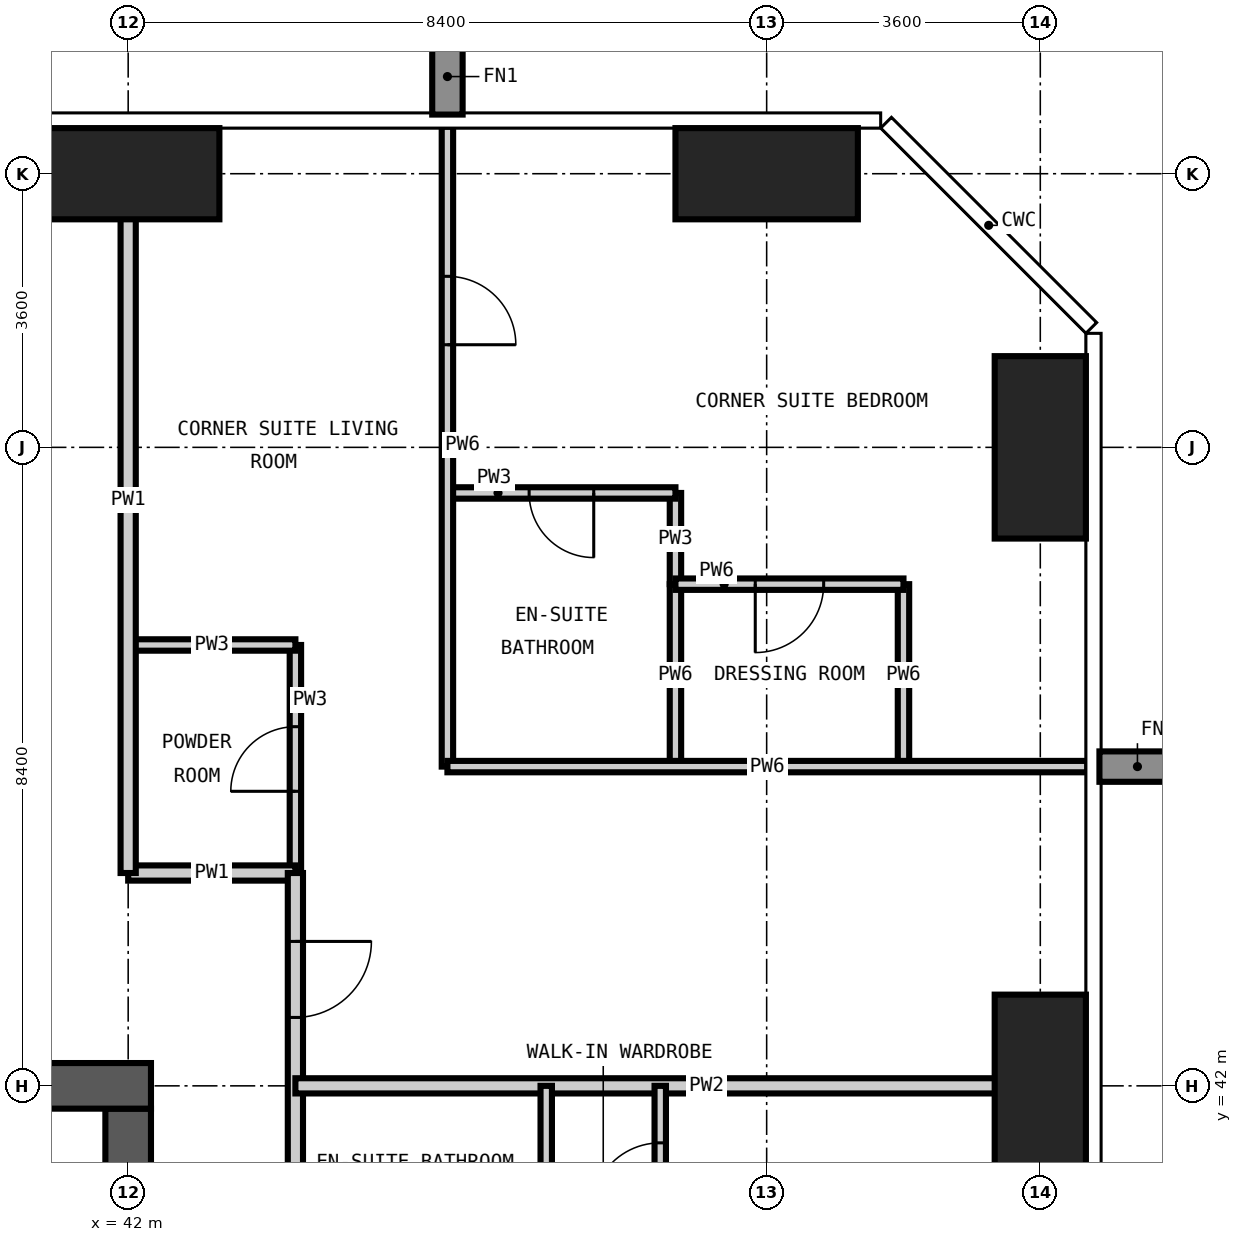
"""IFC4 building model, lengths in metres.
Left out: names, types, materials, properties, quantities, classifications, styles, units other than length and angle.
Written with IfcOpenShell. Run it as: python <this file> out.ifc"""

import sys

from ifc_helpers import new_model, si_unit, direction, frame, frame_2d, origin, origin_2d, place, context, subcontext, project, spatial, rectangle, extrude, element, fill, save


model = new_model("IFC4")
c1 = context("Model", 3, precision=1e-05, world=origin(), true_north=direction((0.0, 1.0)))
c2 = subcontext(c1, "Body", "Model", "MODEL_VIEW")
j1 = project(units=[si_unit("LENGTHUNIT", "METRE"), si_unit("PLANEANGLEUNIT", "RADIAN")], contexts=[c1])
p1 = place(None, origin())
s1 = spatial("IfcSite", under=j1, at=p1, CompositionType="ELEMENT")
p2 = place(p1, origin())
s2 = spatial("IfcBuilding", under=s1, at=p2, CompositionType="ELEMENT")
p3 = place(p2, frame((0.0, 0.0, 198.6)))
s3 = spatial("IfcBuildingStorey", under=s2, at=p3, CompositionType="ELEMENT", Elevation=198.6)
for number, where, z_axis, x_axis in (
    (1, (42.0, 54.0, -0.35), (0.0, 0.0, 1.0), (1.0, 0.0, 0.0)),
    (2, (50.4, 54.0, -0.35), (0.0, 0.0, 1.0), (1.0, 0.0, 0.0)),
):
    element("IfcColumn", number, at=place(p3, frame(where, z_axis=z_axis, x_axis=x_axis)), inside=s3, PredefinedType="COLUMN", context=c2, shape_type="SweptSolid", body=[
        extrude(rectangle(XDim=2.4, YDim=1.2, at=origin_2d()), origin(), (0.0, 0.0, 1.0), 3.6),
    ])
for number, where, z_axis, x_axis in (
    (3, (54.0, 42.0, -0.35), (0.0, 0.0, 1.0), (1.0, 0.0, 0.0)),
    (4, (54.0, 50.4, -0.35), (0.0, 0.0, 1.0), (1.0, 0.0, 0.0)),
):
    element("IfcColumn", number, at=place(p3, frame(where, z_axis=z_axis, x_axis=x_axis)), inside=s3, PredefinedType="COLUMN", context=c2, shape_type="SweptSolid", body=[
        extrude(rectangle(XDim=1.2, YDim=2.4, at=origin_2d()), origin(), (0.0, 0.0, 1.0), 3.6),
    ])
p4 = place(p3, frame((42.0, 17.1, -0.35), z_axis=(0.0, 0.0, 1.0), x_axis=(0.0, 1.0, 0.0)))
e5 = element("IfcWall", 5, at=p4, inside=s3, PredefinedType="SHEAR", context=c2, shape_type="SweptSolid", body=[
    extrude(rectangle(XDim=24.6, YDim=0.6, at=frame_2d((12.3, 0.0))), origin(), (0.0, 0.0, 1.0), 3.6),
])
p5 = place(p4, frame((0.5, 0.0, 0.35)))
e6 = element("IfcOpeningElement", 6, at=p5, cuts=e5, PredefinedType="OPENING", context=c2, shape_type="SweptSolid", body=[
    extrude(rectangle(XDim=1.2, YDim=2.2, at=frame_2d((0.6, 1.1))), frame((0.0, 0.31, 0.0), z_axis=(0.0, -1.0, 0.0), x_axis=(1.0, 0.0, 0.0)), (0.0, 0.0, 1.0), 0.62),
])
p6 = place(p4, frame((11.8, 0.0, 0.35)))
e7 = element("IfcOpeningElement", 7, at=p6, cuts=e5, PredefinedType="OPENING", context=c2, shape_type="SweptSolid", body=[
    extrude(rectangle(XDim=1.0, YDim=2.1, at=frame_2d((0.5, 1.05))), frame((0.0, 0.31, 0.0), z_axis=(0.0, -1.0, 0.0), x_axis=(1.0, 0.0, 0.0)), (0.0, 0.0, 1.0), 0.62),
])
p7 = place(p4, frame((20.2, 0.0, 0.35)))
e8 = element("IfcOpeningElement", 8, at=p7, cuts=e5, PredefinedType="OPENING", context=c2, shape_type="SweptSolid", body=[
    extrude(rectangle(XDim=1.0, YDim=2.1, at=frame_2d((0.5, 1.05))), frame((0.0, 0.31, 0.0), z_axis=(0.0, -1.0, 0.0), x_axis=(1.0, 0.0, 0.0)), (0.0, 0.0, 1.0), 0.62),
])
p8 = place(p3, frame((42.3, 42.0, -0.35), z_axis=(0.0, 0.0, 1.0), x_axis=(-1.0, 0.0, 0.0)))
e9 = element("IfcWall", 9, at=p8, inside=s3, PredefinedType="SHEAR", context=c2, shape_type="SweptSolid", body=[
    extrude(rectangle(XDim=25.8, YDim=0.6, at=frame_2d((12.9, 0.0))), origin(), (0.0, 0.0, 1.0), 3.6),
])
p9 = place(p8, frame((20.8, 0.0, 0.35)))
e10 = element("IfcOpeningElement", 10, at=p9, cuts=e9, PredefinedType="OPENING", context=c2, shape_type="SweptSolid", body=[
    extrude(rectangle(XDim=1.0, YDim=2.1, at=frame_2d((0.5, 1.05))), frame((0.0, 0.31, 0.0), z_axis=(0.0, -1.0, 0.0), x_axis=(1.0, 0.0, 0.0)), (0.0, 0.0, 1.0), 0.62),
])
p10 = place(p8, frame((10.2, 0.0, 0.35)))
e11 = element("IfcOpeningElement", 11, at=p10, cuts=e9, PredefinedType="OPENING", context=c2, shape_type="SweptSolid", body=[
    extrude(rectangle(XDim=1.2, YDim=2.2, at=frame_2d((0.6, 1.1))), frame((0.0, 0.31, 0.0), z_axis=(0.0, -1.0, 0.0), x_axis=(1.0, 0.0, 0.0)), (0.0, 0.0, 1.0), 0.62),
])
p11 = place(p3, frame((44.2, 44.8, 0.0), z_axis=(0.0, 0.0, 1.0), x_axis=(0.0, 1.0, 0.0)))
e12 = element("IfcWall", 12, at=p11, inside=s3, PredefinedType="PARTITIONING", context=c2, shape_type="SweptSolid", body=[
    extrude(rectangle(XDim=3.0, YDim=0.15, at=frame_2d((1.5, 0.0))), origin(), (0.0, 0.0, 1.0), 3.25),
])
p12 = place(p11, frame((1.075, 0.0, 0.0)))
e13 = element("IfcOpeningElement", 13, at=p12, cuts=e12, PredefinedType="OPENING", context=c2, shape_type="SweptSolid", body=[
    extrude(rectangle(XDim=0.85, YDim=2.1, at=frame_2d((0.425, 1.05))), frame((0.0, 0.085, 0.0), z_axis=(0.0, -1.0, 0.0), x_axis=(1.0, 0.0, 0.0)), (0.0, 0.0, 1.0), 0.17),
])
p13 = place(p3, frame((49.2, 48.6, 0.0), z_axis=(0.0, 0.0, 1.0), x_axis=(0.0, 1.0, 0.0)))
e14 = element("IfcWall", 14, at=p13, inside=s3, PredefinedType="PARTITIONING", context=c2, shape_type="SweptSolid", body=[
    extrude(rectangle(XDim=1.2, YDim=0.15, at=frame_2d((0.6, 0.0))), origin(), (0.0, 0.0, 1.0), 3.25),
])
p14 = place(p3, frame((42.0, 47.8, 0.0), z_axis=(0.0, 0.0, 1.0), x_axis=(1.0, 0.0, 0.0)))
e15 = element("IfcWall", 15, at=p14, inside=s3, PredefinedType="PARTITIONING", context=c2, shape_type="SweptSolid", body=[
    extrude(rectangle(XDim=2.2, YDim=0.15, at=frame_2d((1.1, 0.0))), origin(), (0.0, 0.0, 1.0), 3.25),
])
p15 = place(p3, frame((46.2, 49.8, 0.0), z_axis=(0.0, 0.0, 1.0), x_axis=(1.0, 0.0, 0.0)))
e16 = element("IfcWall", 16, at=p15, inside=s3, PredefinedType="PARTITIONING", context=c2, shape_type="SweptSolid", body=[
    extrude(rectangle(XDim=3.0, YDim=0.15, at=frame_2d((1.5, 0.0))), origin(), (0.0, 0.0, 1.0), 3.25),
])
p16 = place(p15, frame((1.075, 0.0, 0.0)))
e17 = element("IfcOpeningElement", 17, at=p16, cuts=e16, PredefinedType="OPENING", context=c2, shape_type="SweptSolid", body=[
    extrude(rectangle(XDim=0.85, YDim=2.1, at=frame_2d((0.425, 1.05))), frame((0.0, 0.085, 0.0), z_axis=(0.0, -1.0, 0.0), x_axis=(1.0, 0.0, 0.0)), (0.0, 0.0, 1.0), 0.17),
])
p17 = place(p3, frame((42.0, 44.8, 0.0), z_axis=(0.0, 0.0, 1.0), x_axis=(1.0, 0.0, 0.0)))
e18 = element("IfcWall", 18, at=p17, inside=s3, PredefinedType="PARTITIONING", context=c2, shape_type="SweptSolid", body=[
    extrude(rectangle(XDim=2.2, YDim=0.2, at=frame_2d((1.1, 0.0))), origin(), (0.0, 0.0, 1.0), 3.25),
])
p18 = place(p3, frame((42.0, 54.618, 0.0), z_axis=(0.0, 0.0, 1.0), x_axis=(0.0, -1.0, 0.0)))
e19 = element("IfcWall", 19, at=p18, inside=s3, PredefinedType="PARTITIONING", context=c2, shape_type="SweptSolid", body=[
    extrude(rectangle(XDim=9.818, YDim=0.2, at=frame_2d((4.909, 0.0))), origin(), (0.0, 0.0, 1.0), 3.25),
])
p19 = place(p3, frame((44.2, 44.8, 0.0), z_axis=(0.0, 0.0, 1.0), x_axis=(0.0, -1.0, 0.0)))
e20 = element("IfcWall", 20, at=p19, inside=s3, PredefinedType="PARTITIONING", context=c2, shape_type="SweptSolid", body=[
    extrude(rectangle(XDim=31.4, YDim=0.2, at=frame_2d((15.7, 0.0))), origin(), (0.0, 0.0, 1.0), 3.25),
])
p20 = place(p19, frame((21.2, 0.0, 0.0)))
e21 = element("IfcOpeningElement", 21, at=p20, cuts=e20, PredefinedType="OPENING", context=c2, shape_type="SweptSolid", body=[
    extrude(rectangle(XDim=1.0, YDim=2.2, at=frame_2d((0.5, 1.1))), frame((0.0, 0.11, 0.0), z_axis=(0.0, -1.0, 0.0), x_axis=(1.0, 0.0, 0.0)), (0.0, 0.0, 1.0), 0.22),
])
p21 = place(p19, frame((8.6, 0.0, 0.0)))
e22 = element("IfcOpeningElement", 22, at=p21, cuts=e20, PredefinedType="OPENING", context=c2, shape_type="SweptSolid", body=[
    extrude(rectangle(XDim=1.0, YDim=2.2, at=frame_2d((0.5, 1.1))), frame((0.0, 0.11, 0.0), z_axis=(0.0, -1.0, 0.0), x_axis=(1.0, 0.0, 0.0)), (0.0, 0.0, 1.0), 0.22),
])
p22 = place(p19, frame((29.2, 0.0, 0.0)))
e23 = element("IfcOpeningElement", 23, at=p22, cuts=e20, PredefinedType="OPENING", context=c2, shape_type="SweptSolid", body=[
    extrude(rectangle(XDim=1.0, YDim=2.2, at=frame_2d((0.5, 1.1))), frame((0.0, 0.11, 0.0), z_axis=(0.0, -1.0, 0.0), x_axis=(1.0, 0.0, 0.0)), (0.0, 0.0, 1.0), 0.22),
])
p23 = place(p19, frame((0.9, 0.0, 0.0)))
e24 = element("IfcOpeningElement", 24, at=p23, cuts=e20, PredefinedType="OPENING", context=c2, shape_type="SweptSolid", body=[
    extrude(rectangle(XDim=1.0, YDim=2.2, at=frame_2d((0.5, 1.1))), frame((0.0, 0.11, 0.0), z_axis=(0.0, -1.0, 0.0), x_axis=(1.0, 0.0, 0.0)), (0.0, 0.0, 1.0), 0.22),
])
p24 = place(p3, frame((44.2, 42.0, 0.0), z_axis=(0.0, 0.0, 1.0), x_axis=(1.0, 0.0, 0.0)))
e25 = element("IfcWall", 25, at=p24, inside=s3, PredefinedType="PARTITIONING", context=c2, shape_type="SweptSolid", body=[
    extrude(rectangle(XDim=10.418, YDim=0.2, at=frame_2d((5.209, 0.0))), origin(), (0.0, 0.0, 1.0), 3.25),
])
p25 = place(p3, frame((46.2, 46.2, 0.0), z_axis=(0.0, 0.0, 1.0), x_axis=(0.0, 1.0, 0.0)))
e26 = element("IfcWall", 26, at=p25, inside=s3, PredefinedType="PARTITIONING", context=c2, shape_type="SweptSolid", body=[
    extrude(rectangle(XDim=8.418, YDim=0.15, at=frame_2d((4.209, 0.0))), origin(), (0.0, 0.0, 1.0), 3.25),
])
p26 = place(p25, frame((5.55, 0.0, 0.0)))
e27 = element("IfcOpeningElement", 27, at=p26, cuts=e26, PredefinedType="OPENING", context=c2, shape_type="SweptSolid", body=[
    extrude(rectangle(XDim=0.9, YDim=2.1, at=frame_2d((0.45, 1.05))), frame((0.0, 0.085, 0.0), z_axis=(0.0, -1.0, 0.0), x_axis=(1.0, 0.0, 0.0)), (0.0, 0.0, 1.0), 0.17),
])
p27 = place(p3, frame((47.5, 39.6, 0.0), z_axis=(0.0, 0.0, 1.0), x_axis=(0.0, 1.0, 0.0)))
e28 = element("IfcWall", 28, at=p27, inside=s3, PredefinedType="PARTITIONING", context=c2, shape_type="SweptSolid", body=[
    extrude(rectangle(XDim=2.4, YDim=0.15, at=frame_2d((1.2, 0.0))), origin(), (0.0, 0.0, 1.0), 3.25),
])
p28 = place(p3, frame((49.0, 39.6, 0.0), z_axis=(0.0, 0.0, 1.0), x_axis=(0.0, 1.0, 0.0)))
e29 = element("IfcWall", 29, at=p28, inside=s3, PredefinedType="PARTITIONING", context=c2, shape_type="SweptSolid", body=[
    extrude(rectangle(XDim=2.4, YDim=0.15, at=frame_2d((1.2, 0.0))), origin(), (0.0, 0.0, 1.0), 3.25),
])
p29 = place(p28, frame((0.75, 0.0, 0.0)))
e30 = element("IfcOpeningElement", 30, at=p29, cuts=e29, PredefinedType="OPENING", context=c2, shape_type="SweptSolid", body=[
    extrude(rectangle(XDim=0.9, YDim=2.1, at=frame_2d((0.45, 1.05))), frame((0.0, 0.085, 0.0), z_axis=(0.0, -1.0, 0.0), x_axis=(1.0, 0.0, 0.0)), (0.0, 0.0, 1.0), 0.17),
])
for number, where, z_axis, x_axis in (
    (31, (49.2, 46.2, 0.0), (0.0, 0.0, 1.0), (0.0, 1.0, 0.0)),
    (32, (52.2, 46.2, 0.0), (0.0, 0.0, 1.0), (0.0, 1.0, 0.0)),
):
    element("IfcWall", number, at=place(p3, frame(where, z_axis=z_axis, x_axis=x_axis)), inside=s3, PredefinedType="PARTITIONING", context=c2, shape_type="SweptSolid", body=[
        extrude(rectangle(XDim=2.4, YDim=0.15, at=frame_2d((1.2, 0.0))), origin(), (0.0, 0.0, 1.0), 3.25),
    ])
p30 = place(p3, frame((46.2, 46.2, 0.0), z_axis=(0.0, 0.0, 1.0), x_axis=(1.0, 0.0, 0.0)))
e33 = element("IfcWall", 33, at=p30, inside=s3, PredefinedType="PARTITIONING", context=c2, shape_type="SweptSolid", body=[
    extrude(rectangle(XDim=8.418, YDim=0.15, at=frame_2d((4.209, 0.0))), origin(), (0.0, 0.0, 1.0), 3.25),
])
p31 = place(p3, frame((49.2, 48.6, 0.0), z_axis=(0.0, 0.0, 1.0), x_axis=(1.0, 0.0, 0.0)))
e34 = element("IfcWall", 34, at=p31, inside=s3, PredefinedType="PARTITIONING", context=c2, shape_type="SweptSolid", body=[
    extrude(rectangle(XDim=3.0, YDim=0.15, at=frame_2d((1.5, 0.0))), origin(), (0.0, 0.0, 1.0), 3.25),
])
p32 = place(p31, frame((1.05, 0.0, 0.0)))
e35 = element("IfcOpeningElement", 35, at=p32, cuts=e34, PredefinedType="OPENING", context=c2, shape_type="SweptSolid", body=[
    extrude(rectangle(XDim=0.9, YDim=2.1, at=frame_2d((0.45, 1.05))), frame((0.0, 0.085, 0.0), z_axis=(0.0, -1.0, 0.0), x_axis=(1.0, 0.0, 0.0)), (0.0, 0.0, 1.0), 0.17),
])
p33 = place(p29, origin())
e36 = element("IfcDoor", 36, at=p33, inside=s3, OperationType="SINGLE_SWING_LEFT", PredefinedType="DOOR", context=c2, shape_type="SweptSolid", body=[
    extrude(rectangle(XDim=0.9, YDim=2.1, at=frame_2d((0.45, 1.05))), frame((0.0, 0.025, 0.0), z_axis=(0.0, -1.0, 0.0), x_axis=(1.0, 0.0, 0.0)), (0.0, 0.0, 1.0), 0.05),
])
fill(e30, e36)
p34 = place(p23, origin())
e37 = element("IfcDoor", 37, at=p34, inside=s3, OperationType="SINGLE_SWING_LEFT", PredefinedType="DOOR", context=c2, shape_type="SweptSolid", body=[
    extrude(rectangle(XDim=1.0, YDim=2.2, at=frame_2d((0.5, 1.1))), frame((0.0, 0.025, 0.0), z_axis=(0.0, -1.0, 0.0), x_axis=(1.0, 0.0, 0.0)), (0.0, 0.0, 1.0), 0.05),
])
fill(e24, e37)
p35 = place(p12, origin())
e38 = element("IfcDoor", 38, at=p35, inside=s3, OperationType="SINGLE_SWING_LEFT", PredefinedType="DOOR", context=c2, shape_type="SweptSolid", body=[
    extrude(rectangle(XDim=0.85, YDim=2.1, at=frame_2d((0.425, 1.05))), frame((0.0, 0.025, 0.0), z_axis=(0.0, -1.0, 0.0), x_axis=(1.0, 0.0, 0.0)), (0.0, 0.0, 1.0), 0.05),
])
fill(e13, e38)
p36 = place(p26, frame((0.9, 0.0, 0.0), z_axis=(0.0, 0.0, 1.0), x_axis=(-1.0, 0.0, 0.0)))
e39 = element("IfcDoor", 39, at=p36, inside=s3, OperationType="SINGLE_SWING_RIGHT", PredefinedType="DOOR", context=c2, shape_type="SweptSolid", body=[
    extrude(rectangle(XDim=0.9, YDim=2.1, at=frame_2d((0.45, 1.05))), frame((0.0, 0.025, 0.0), z_axis=(0.0, -1.0, 0.0), x_axis=(1.0, 0.0, 0.0)), (0.0, 0.0, 1.0), 0.05),
])
fill(e27, e39)
p37 = place(p16, frame((0.85, 0.0, 0.0), z_axis=(0.0, 0.0, 1.0), x_axis=(-1.0, 0.0, 0.0)))
e40 = element("IfcDoor", 40, at=p37, inside=s3, OperationType="SINGLE_SWING_LEFT", PredefinedType="DOOR", context=c2, shape_type="SweptSolid", body=[
    extrude(rectangle(XDim=0.85, YDim=2.1, at=frame_2d((0.425, 1.05))), frame((0.0, 0.025, 0.0), z_axis=(0.0, -1.0, 0.0), x_axis=(1.0, 0.0, 0.0)), (0.0, 0.0, 1.0), 0.05),
])
fill(e17, e40)
p38 = place(p32, frame((0.9, 0.0, 0.0), z_axis=(0.0, 0.0, 1.0), x_axis=(-1.0, 0.0, 0.0)))
e41 = element("IfcDoor", 41, at=p38, inside=s3, OperationType="SINGLE_SWING_RIGHT", PredefinedType="DOOR", context=c2, shape_type="SweptSolid", body=[
    extrude(rectangle(XDim=0.9, YDim=2.1, at=frame_2d((0.45, 1.05))), frame((0.0, 0.025, 0.0), z_axis=(0.0, -1.0, 0.0), x_axis=(1.0, 0.0, 0.0)), (0.0, 0.0, 1.0), 0.05),
])
fill(e35, e41)
save(model, sys.argv[1])
